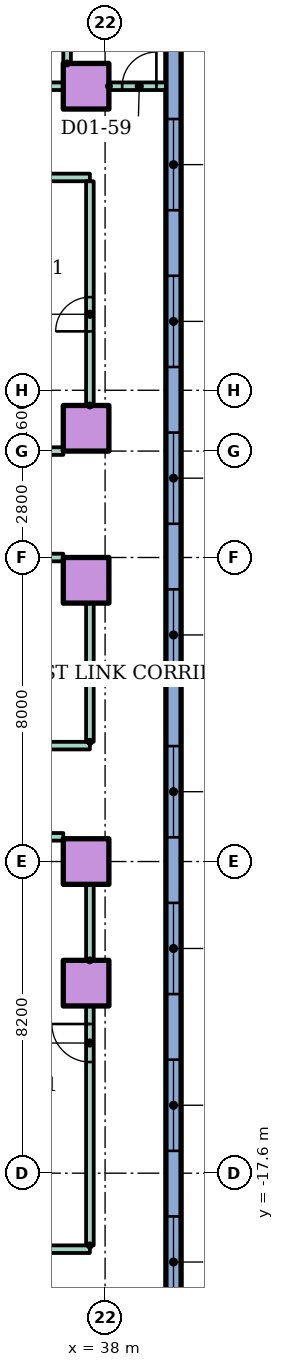
"""IFC4 building model, lengths in metres.
Left out: names, types, materials, properties, quantities, classifications, styles, units other than length and angle.
Written with IfcOpenShell. Run it as: python <this file> out.ifc"""

import sys

from ifc_helpers import new_model, si_unit, direction, frame, frame_2d, origin, origin_2d, place, context, subcontext, project, spatial, rectangle, hollow_rectangle, extrude, element, fill, save


model = new_model("IFC4")
c1 = context("Model", 3, precision=1e-05, world=origin(), true_north=direction((0.0, 1.0)))
c2 = subcontext(c1, "Body", "Model", "MODEL_VIEW")
j1 = project(units=[si_unit("LENGTHUNIT", "METRE"), si_unit("PLANEANGLEUNIT", "RADIAN")], contexts=[c1])
p1 = place(None, origin())
s1 = spatial("IfcSite", under=j1, at=p1, CompositionType="ELEMENT")
p2 = place(p1, origin())
s2 = spatial("IfcBuilding", under=s1, at=p2, CompositionType="ELEMENT")
p3 = place(p2, frame((0.0, 0.0, 6.0)))
s3 = spatial("IfcBuildingStorey", under=s2, at=p3, CompositionType="ELEMENT", Elevation=6.0)
for number, where in (
    (1, (37.5, -12.6, 0.0)),
    (2, (37.5, -9.4, 0.0)),
    (3, (37.5, -2.0, 0.0)),
    (4, (37.5, 2.0, 0.0)),
    (5, (37.5, 11.0, 0.0)),
):
    element("IfcColumn", number, at=place(p3, frame(where)), inside=s3, PredefinedType="COLUMN", context=c2, shape_type="SweptSolid", body=[
        extrude(hollow_rectangle(XDim=1.2, YDim=1.2, WallThickness=0.06, at=origin_2d()), origin(), (0.0, 0.0, 1.0), 4.0),
    ])
p4 = place(p3, frame((39.8, -50.0, 0.0), z_axis=(0.0, 0.0, 1.0), x_axis=(0.0, 1.0, 0.0)))
e6 = element("IfcWall", 6, at=p4, inside=s3, PredefinedType="STANDARD", context=c2, shape_type="SweptSolid", body=[
    extrude(rectangle(XDim=70.0, YDim=0.4, at=frame_2d((35.0, 0.0))), origin(), (0.0, 0.0, 1.0), 3.7),
])
p5 = place(p4, frame((0.75, 0.0, 0.9)))
e7 = element("IfcOpeningElement", 7, at=p5, cuts=e6, PredefinedType="OPENING", context=c2, shape_type="SweptSolid", body=[
    extrude(rectangle(XDim=2.4, YDim=2.1, at=frame_2d((1.2, 1.05))), frame((0.0, 0.21, 0.0), z_axis=(0.0, -1.0, 0.0), x_axis=(1.0, 0.0, 0.0)), (0.0, 0.0, 1.0), 0.42),
])
p6 = place(p4, frame((6.633, 0.0, 0.9)))
e8 = element("IfcOpeningElement", 8, at=p6, cuts=e6, PredefinedType="OPENING", context=c2, shape_type="SweptSolid", body=[
    extrude(rectangle(XDim=2.4, YDim=2.1, at=frame_2d((1.2, 1.05))), frame((0.0, 0.21, 0.0), z_axis=(0.0, -1.0, 0.0), x_axis=(1.0, 0.0, 0.0)), (0.0, 0.0, 1.0), 0.42),
])
p7 = place(p4, frame((10.3, 0.0, 0.9)))
e9 = element("IfcOpeningElement", 9, at=p7, cuts=e6, PredefinedType="OPENING", context=c2, shape_type="SweptSolid", body=[
    extrude(rectangle(XDim=2.4, YDim=2.1, at=frame_2d((1.2, 1.05))), frame((0.0, 0.21, 0.0), z_axis=(0.0, -1.0, 0.0), x_axis=(1.0, 0.0, 0.0)), (0.0, 0.0, 1.0), 0.42),
])
p8 = place(p4, frame((13.967, 0.0, 0.9)))
e10 = element("IfcOpeningElement", 10, at=p8, cuts=e6, PredefinedType="OPENING", context=c2, shape_type="SweptSolid", body=[
    extrude(rectangle(XDim=2.4, YDim=2.1, at=frame_2d((1.2, 1.05))), frame((0.0, 0.21, 0.0), z_axis=(0.0, -1.0, 0.0), x_axis=(1.0, 0.0, 0.0)), (0.0, 0.0, 1.0), 0.42),
])
p9 = place(p4, frame((28.863, 0.0, 0.9)))
e11 = element("IfcOpeningElement", 11, at=p9, cuts=e6, PredefinedType="OPENING", context=c2, shape_type="SweptSolid", body=[
    extrude(rectangle(XDim=2.4, YDim=2.1, at=frame_2d((1.2, 1.05))), frame((0.0, 0.21, 0.0), z_axis=(0.0, -1.0, 0.0), x_axis=(1.0, 0.0, 0.0)), (0.0, 0.0, 1.0), 0.42),
])
p10 = place(p4, frame((32.988, 0.0, 0.9)))
e12 = element("IfcOpeningElement", 12, at=p10, cuts=e6, PredefinedType="OPENING", context=c2, shape_type="SweptSolid", body=[
    extrude(rectangle(XDim=2.4, YDim=2.1, at=frame_2d((1.2, 1.05))), frame((0.0, 0.21, 0.0), z_axis=(0.0, -1.0, 0.0), x_axis=(1.0, 0.0, 0.0)), (0.0, 0.0, 1.0), 0.42),
])
p11 = place(p4, frame((37.113, 0.0, 0.9)))
e13 = element("IfcOpeningElement", 13, at=p11, cuts=e6, PredefinedType="OPENING", context=c2, shape_type="SweptSolid", body=[
    extrude(rectangle(XDim=2.4, YDim=2.1, at=frame_2d((1.2, 1.05))), frame((0.0, 0.21, 0.0), z_axis=(0.0, -1.0, 0.0), x_axis=(1.0, 0.0, 0.0)), (0.0, 0.0, 1.0), 0.42),
])
p12 = place(p4, frame((41.238, 0.0, 0.9)))
e14 = element("IfcOpeningElement", 14, at=p12, cuts=e6, PredefinedType="OPENING", context=c2, shape_type="SweptSolid", body=[
    extrude(rectangle(XDim=2.4, YDim=2.1, at=frame_2d((1.2, 1.05))), frame((0.0, 0.21, 0.0), z_axis=(0.0, -1.0, 0.0), x_axis=(1.0, 0.0, 0.0)), (0.0, 0.0, 1.0), 0.42),
])
p13 = place(p4, frame((45.363, 0.0, 0.9)))
e15 = element("IfcOpeningElement", 15, at=p13, cuts=e6, PredefinedType="OPENING", context=c2, shape_type="SweptSolid", body=[
    extrude(rectangle(XDim=2.4, YDim=2.1, at=frame_2d((1.2, 1.05))), frame((0.0, 0.21, 0.0), z_axis=(0.0, -1.0, 0.0), x_axis=(1.0, 0.0, 0.0)), (0.0, 0.0, 1.0), 0.42),
])
p14 = place(p4, frame((49.488, 0.0, 0.9)))
e16 = element("IfcOpeningElement", 16, at=p14, cuts=e6, PredefinedType="OPENING", context=c2, shape_type="SweptSolid", body=[
    extrude(rectangle(XDim=2.4, YDim=2.1, at=frame_2d((1.2, 1.05))), frame((0.0, 0.21, 0.0), z_axis=(0.0, -1.0, 0.0), x_axis=(1.0, 0.0, 0.0)), (0.0, 0.0, 1.0), 0.42),
])
p15 = place(p4, frame((53.613, 0.0, 0.9)))
e17 = element("IfcOpeningElement", 17, at=p15, cuts=e6, PredefinedType="OPENING", context=c2, shape_type="SweptSolid", body=[
    extrude(rectangle(XDim=2.4, YDim=2.1, at=frame_2d((1.2, 1.05))), frame((0.0, 0.21, 0.0), z_axis=(0.0, -1.0, 0.0), x_axis=(1.0, 0.0, 0.0)), (0.0, 0.0, 1.0), 0.42),
])
p16 = place(p4, frame((57.738, 0.0, 0.9)))
e18 = element("IfcOpeningElement", 18, at=p16, cuts=e6, PredefinedType="OPENING", context=c2, shape_type="SweptSolid", body=[
    extrude(rectangle(XDim=2.4, YDim=2.1, at=frame_2d((1.2, 1.05))), frame((0.0, 0.21, 0.0), z_axis=(0.0, -1.0, 0.0), x_axis=(1.0, 0.0, 0.0)), (0.0, 0.0, 1.0), 0.42),
])
p17 = place(p4, frame((62.05, 0.0, 0.9)))
e19 = element("IfcOpeningElement", 19, at=p17, cuts=e6, PredefinedType="OPENING", context=c2, shape_type="SweptSolid", body=[
    extrude(rectangle(XDim=2.4, YDim=2.1, at=frame_2d((1.2, 1.05))), frame((0.0, 0.21, 0.0), z_axis=(0.0, -1.0, 0.0), x_axis=(1.0, 0.0, 0.0)), (0.0, 0.0, 1.0), 0.42),
])
p18 = place(p4, frame((66.55, 0.0, 0.9)))
e20 = element("IfcOpeningElement", 20, at=p18, cuts=e6, PredefinedType="OPENING", context=c2, shape_type="SweptSolid", body=[
    extrude(rectangle(XDim=2.4, YDim=2.1, at=frame_2d((1.2, 1.05))), frame((0.0, 0.21, 0.0), z_axis=(0.0, -1.0, 0.0), x_axis=(1.0, 0.0, 0.0)), (0.0, 0.0, 1.0), 0.42),
])
p19 = place(p3, frame((-37.6, -19.6, 0.0)))
e21 = element("IfcWall", 21, at=p19, inside=s3, PredefinedType="PARTITIONING", context=c2, shape_type="SweptSolid", body=[
    extrude(rectangle(XDim=75.2, YDim=0.2, at=frame_2d((37.6, 0.0))), origin(), (0.0, 0.0, 1.0), 3.7),
])
p20 = place(p19, frame((14.5, 0.0, 0.0)))
e22 = element("IfcOpeningElement", 22, at=p20, cuts=e21, PredefinedType="OPENING", context=c2, shape_type="SweptSolid", body=[
    extrude(rectangle(XDim=1.0, YDim=2.1, at=frame_2d((0.5, 1.05))), frame((0.0, 0.11, 0.0), z_axis=(0.0, -1.0, 0.0), x_axis=(1.0, 0.0, 0.0)), (0.0, 0.0, 1.0), 0.22),
])
p21 = place(p19, frame((22.184, 0.0, 0.0)))
e23 = element("IfcOpeningElement", 23, at=p21, cuts=e21, PredefinedType="OPENING", context=c2, shape_type="SweptSolid", body=[
    extrude(rectangle(XDim=1.0, YDim=2.1, at=frame_2d((0.5, 1.05))), frame((0.0, 0.11, 0.0), z_axis=(0.0, -1.0, 0.0), x_axis=(1.0, 0.0, 0.0)), (0.0, 0.0, 1.0), 0.22),
])
p22 = place(p19, frame((29.016, 0.0, 0.0)))
e24 = element("IfcOpeningElement", 24, at=p22, cuts=e21, PredefinedType="OPENING", context=c2, shape_type="SweptSolid", body=[
    extrude(rectangle(XDim=1.0, YDim=2.1, at=frame_2d((0.5, 1.05))), frame((0.0, 0.11, 0.0), z_axis=(0.0, -1.0, 0.0), x_axis=(1.0, 0.0, 0.0)), (0.0, 0.0, 1.0), 0.22),
])
p23 = place(p19, frame((34.34, 0.0, 0.0)))
e25 = element("IfcOpeningElement", 25, at=p23, cuts=e21, PredefinedType="OPENING", context=c2, shape_type="SweptSolid", body=[
    extrude(rectangle(XDim=1.0, YDim=2.1, at=frame_2d((0.5, 1.05))), frame((0.0, 0.11, 0.0), z_axis=(0.0, -1.0, 0.0), x_axis=(1.0, 0.0, 0.0)), (0.0, 0.0, 1.0), 0.22),
])
p24 = place(p19, frame((41.06, 0.0, 0.0)))
e26 = element("IfcOpeningElement", 26, at=p24, cuts=e21, PredefinedType="OPENING", context=c2, shape_type="SweptSolid", body=[
    extrude(rectangle(XDim=1.0, YDim=2.1, at=frame_2d((0.5, 1.05))), frame((0.0, 0.11, 0.0), z_axis=(0.0, -1.0, 0.0), x_axis=(1.0, 0.0, 0.0)), (0.0, 0.0, 1.0), 0.22),
])
p25 = place(p19, frame((46.95, 0.0, 0.0)))
e27 = element("IfcOpeningElement", 27, at=p25, cuts=e21, PredefinedType="OPENING", context=c2, shape_type="SweptSolid", body=[
    extrude(rectangle(XDim=1.1, YDim=2.1, at=frame_2d((0.55, 1.05))), frame((0.0, 0.11, 0.0), z_axis=(0.0, -1.0, 0.0), x_axis=(1.0, 0.0, 0.0)), (0.0, 0.0, 1.0), 0.22),
])
p26 = place(p19, frame((55.35, 0.0, 0.0)))
e28 = element("IfcOpeningElement", 28, at=p26, cuts=e21, PredefinedType="OPENING", context=c2, shape_type="SweptSolid", body=[
    extrude(rectangle(XDim=1.1, YDim=2.1, at=frame_2d((0.55, 1.05))), frame((0.0, 0.11, 0.0), z_axis=(0.0, -1.0, 0.0), x_axis=(1.0, 0.0, 0.0)), (0.0, 0.0, 1.0), 0.22),
])
p27 = place(p19, frame((62.7, 0.0, 0.0)))
e29 = element("IfcOpeningElement", 29, at=p27, cuts=e21, PredefinedType="OPENING", context=c2, shape_type="SweptSolid", body=[
    extrude(rectangle(XDim=1.0, YDim=2.1, at=frame_2d((0.5, 1.05))), frame((0.0, 0.11, 0.0), z_axis=(0.0, -1.0, 0.0), x_axis=(1.0, 0.0, 0.0)), (0.0, 0.0, 1.0), 0.22),
])
p28 = place(p3, frame((-36.9, -8.75, 0.0)))
e30 = element("IfcWall", 30, at=p28, inside=s3, PredefinedType="PARTITIONING", context=c2, shape_type="SweptSolid", body=[
    extrude(rectangle(XDim=73.8, YDim=0.2, at=frame_2d((36.9, 0.0))), origin(), (0.0, 0.0, 1.0), 3.7),
])
p29 = place(p3, frame((-37.6, -6.35, 0.0)))
e31 = element("IfcWall", 31, at=p29, inside=s3, PredefinedType="PARTITIONING", context=c2, shape_type="SweptSolid", body=[
    extrude(rectangle(XDim=75.2, YDim=0.2, at=frame_2d((37.6, 0.0))), origin(), (0.0, 0.0, 1.0), 3.7),
])
p30 = place(p29, frame((4.0, 0.0, 0.0)))
e32 = element("IfcOpeningElement", 32, at=p30, cuts=e31, PredefinedType="OPENING", context=c2, shape_type="SweptSolid", body=[
    extrude(rectangle(XDim=1.0, YDim=2.1, at=frame_2d((0.5, 1.05))), frame((0.0, 0.11, 0.0), z_axis=(0.0, -1.0, 0.0), x_axis=(1.0, 0.0, 0.0)), (0.0, 0.0, 1.0), 0.22),
])
p31 = place(p29, frame((13.0, 0.0, 0.0)))
e33 = element("IfcOpeningElement", 33, at=p31, cuts=e31, PredefinedType="OPENING", context=c2, shape_type="SweptSolid", body=[
    extrude(rectangle(XDim=1.0, YDim=2.1, at=frame_2d((0.5, 1.05))), frame((0.0, 0.11, 0.0), z_axis=(0.0, -1.0, 0.0), x_axis=(1.0, 0.0, 0.0)), (0.0, 0.0, 1.0), 0.22),
])
p32 = place(p29, frame((21.55, 0.0, 0.0)))
e34 = element("IfcOpeningElement", 34, at=p32, cuts=e31, PredefinedType="OPENING", context=c2, shape_type="SweptSolid", body=[
    extrude(rectangle(XDim=0.9, YDim=2.1, at=frame_2d((0.45, 1.05))), frame((0.0, 0.11, 0.0), z_axis=(0.0, -1.0, 0.0), x_axis=(1.0, 0.0, 0.0)), (0.0, 0.0, 1.0), 0.22),
])
p33 = place(p29, frame((31.5, 0.0, 0.0)))
e35 = element("IfcOpeningElement", 35, at=p33, cuts=e31, PredefinedType="OPENING", context=c2, shape_type="SweptSolid", body=[
    extrude(rectangle(XDim=1.0, YDim=2.1, at=frame_2d((0.5, 1.05))), frame((0.0, 0.11, 0.0), z_axis=(0.0, -1.0, 0.0), x_axis=(1.0, 0.0, 0.0)), (0.0, 0.0, 1.0), 0.22),
])
p34 = place(p29, frame((43.5, 0.0, 0.0)))
e36 = element("IfcOpeningElement", 36, at=p34, cuts=e31, PredefinedType="OPENING", context=c2, shape_type="SweptSolid", body=[
    extrude(rectangle(XDim=1.0, YDim=2.1, at=frame_2d((0.5, 1.05))), frame((0.0, 0.11, 0.0), z_axis=(0.0, -1.0, 0.0), x_axis=(1.0, 0.0, 0.0)), (0.0, 0.0, 1.0), 0.22),
])
p35 = place(p29, frame((62.1, 0.0, 0.0)))
e37 = element("IfcOpeningElement", 37, at=p35, cuts=e31, PredefinedType="OPENING", context=c2, shape_type="SweptSolid", body=[
    extrude(rectangle(XDim=1.0, YDim=2.1, at=frame_2d((0.5, 1.05))), frame((0.0, 0.11, 0.0), z_axis=(0.0, -1.0, 0.0), x_axis=(1.0, 0.0, 0.0)), (0.0, 0.0, 1.0), 0.22),
])
p36 = place(p3, frame((14.0, -1.4, 0.0)))
e38 = element("IfcWall", 38, at=p36, inside=s3, PredefinedType="PARTITIONING", context=c2, shape_type="SweptSolid", body=[
    extrude(rectangle(XDim=22.9, YDim=0.2, at=frame_2d((11.45, 0.0))), origin(), (0.0, 0.0, 1.0), 3.7),
])
p37 = place(p3, frame((16.3, 1.4, 0.0)))
e39 = element("IfcWall", 39, at=p37, inside=s3, PredefinedType="PARTITIONING", context=c2, shape_type="SweptSolid", body=[
    extrude(rectangle(XDim=20.6, YDim=0.2, at=frame_2d((10.3, 0.0))), origin(), (0.0, 0.0, 1.0), 3.7),
])
p38 = place(p37, frame((2.35, 0.0, 0.0)))
e40 = element("IfcOpeningElement", 40, at=p38, cuts=e39, PredefinedType="OPENING", context=c2, shape_type="SweptSolid", body=[
    extrude(rectangle(XDim=1.0, YDim=2.1, at=frame_2d((0.5, 1.05))), frame((0.0, 0.11, 0.0), z_axis=(0.0, -1.0, 0.0), x_axis=(1.0, 0.0, 0.0)), (0.0, 0.0, 1.0), 0.22),
])
p39 = place(p37, frame((7.1, 0.0, 0.0)))
e41 = element("IfcOpeningElement", 41, at=p39, cuts=e39, PredefinedType="OPENING", context=c2, shape_type="SweptSolid", body=[
    extrude(rectangle(XDim=1.0, YDim=2.1, at=frame_2d((0.5, 1.05))), frame((0.0, 0.11, 0.0), z_axis=(0.0, -1.0, 0.0), x_axis=(1.0, 0.0, 0.0)), (0.0, 0.0, 1.0), 0.22),
])
p40 = place(p37, frame((10.8, 0.0, 0.0)))
e42 = element("IfcOpeningElement", 42, at=p40, cuts=e39, PredefinedType="OPENING", context=c2, shape_type="SweptSolid", body=[
    extrude(rectangle(XDim=1.0, YDim=2.1, at=frame_2d((0.5, 1.05))), frame((0.0, 0.11, 0.0), z_axis=(0.0, -1.0, 0.0), x_axis=(1.0, 0.0, 0.0)), (0.0, 0.0, 1.0), 0.22),
])
p41 = place(p37, frame((13.15, 0.0, 0.0)))
e43 = element("IfcOpeningElement", 43, at=p41, cuts=e39, PredefinedType="OPENING", context=c2, shape_type="SweptSolid", body=[
    extrude(rectangle(XDim=0.9, YDim=2.1, at=frame_2d((0.45, 1.05))), frame((0.0, 0.11, 0.0), z_axis=(0.0, -1.0, 0.0), x_axis=(1.0, 0.0, 0.0)), (0.0, 0.0, 1.0), 0.22),
])
p42 = place(p3, frame((16.3, 8.6, 0.0)))
e44 = element("IfcWall", 44, at=p42, inside=s3, PredefinedType="PARTITIONING", context=c2, shape_type="SweptSolid", body=[
    extrude(rectangle(XDim=21.3, YDim=0.2, at=frame_2d((10.65, 0.0))), origin(), (0.0, 0.0, 1.0), 3.7),
])
p43 = place(p3, frame((34.5, 11.0, 0.0)))
e45 = element("IfcWall", 45, at=p43, inside=s3, PredefinedType="PARTITIONING", context=c2, shape_type="SweptSolid", body=[
    extrude(rectangle(XDim=2.4, YDim=0.2, at=frame_2d((1.2, 0.0))), origin(), (0.0, 0.0, 1.0), 3.7),
])
p44 = place(p3, frame((38.1, 11.0, 0.0)))
e46 = element("IfcWall", 46, at=p44, inside=s3, PredefinedType="PARTITIONING", context=c2, shape_type="SweptSolid", body=[
    extrude(rectangle(XDim=1.5, YDim=0.2, at=frame_2d((0.75, 0.0))), origin(), (0.0, 0.0, 1.0), 3.7),
])
p45 = place(p44, frame((0.35, 0.0, 0.0)))
e47 = element("IfcOpeningElement", 47, at=p45, cuts=e46, PredefinedType="OPENING", context=c2, shape_type="SweptSolid", body=[
    extrude(rectangle(XDim=0.9, YDim=2.1, at=frame_2d((0.45, 1.05))), frame((0.0, 0.11, 0.0), z_axis=(0.0, -1.0, 0.0), x_axis=(1.0, 0.0, 0.0)), (0.0, 0.0, 1.0), 0.22),
])
p46 = place(p3, frame((37.0, 11.6, 0.0), z_axis=(0.0, 0.0, 1.0), x_axis=(0.0, 1.0, 0.0)))
e48 = element("IfcWall", 48, at=p46, inside=s3, PredefinedType="PARTITIONING", context=c2, shape_type="SweptSolid", body=[
    extrude(rectangle(XDim=2.8, YDim=0.2, at=frame_2d((1.4, 0.0))), origin(), (0.0, 0.0, 1.0), 3.7),
])
p47 = place(p3, frame((37.6, -19.5, 0.0), z_axis=(0.0, 0.0, 1.0), x_axis=(0.0, 1.0, 0.0)))
e49 = element("IfcWall", 49, at=p47, inside=s3, PredefinedType="PARTITIONING", context=c2, shape_type="SweptSolid", body=[
    extrude(rectangle(XDim=6.3, YDim=0.2, at=frame_2d((3.15, 0.0))), origin(), (0.0, 0.0, 1.0), 3.7),
])
p48 = place(p47, frame((4.825, 0.0, 0.0)))
e50 = element("IfcOpeningElement", 50, at=p48, cuts=e49, PredefinedType="OPENING", context=c2, shape_type="SweptSolid", body=[
    extrude(rectangle(XDim=1.0, YDim=2.1, at=frame_2d((0.5, 1.05))), frame((0.0, 0.11, 0.0), z_axis=(0.0, -1.0, 0.0), x_axis=(1.0, 0.0, 0.0)), (0.0, 0.0, 1.0), 0.22),
])
p49 = place(p3, frame((37.6, -12.0, 0.0), z_axis=(0.0, 0.0, 1.0), x_axis=(0.0, 1.0, 0.0)))
e51 = element("IfcWall", 51, at=p49, inside=s3, PredefinedType="PARTITIONING", context=c2, shape_type="SweptSolid", body=[
    extrude(rectangle(XDim=2.0, YDim=0.2, at=frame_2d((1.0, 0.0))), origin(), (0.0, 0.0, 1.0), 3.7),
])
p50 = place(p3, frame((37.6, -6.25, 0.0), z_axis=(0.0, 0.0, 1.0), x_axis=(0.0, 1.0, 0.0)))
e52 = element("IfcWall", 52, at=p50, inside=s3, PredefinedType="PARTITIONING", context=c2, shape_type="SweptSolid", body=[
    extrude(rectangle(XDim=3.65, YDim=0.2, at=frame_2d((1.825, 0.0))), origin(), (0.0, 0.0, 1.0), 3.7),
])
p51 = place(p3, frame((37.6, 2.6, 0.0), z_axis=(0.0, 0.0, 1.0), x_axis=(0.0, 1.0, 0.0)))
e53 = element("IfcWall", 53, at=p51, inside=s3, PredefinedType="PARTITIONING", context=c2, shape_type="SweptSolid", body=[
    extrude(rectangle(XDim=5.9, YDim=0.2, at=frame_2d((2.95, 0.0))), origin(), (0.0, 0.0, 1.0), 3.7),
])
p52 = place(p51, frame((1.95, 0.0, 0.0)))
e54 = element("IfcOpeningElement", 54, at=p52, cuts=e53, PredefinedType="OPENING", context=c2, shape_type="SweptSolid", body=[
    extrude(rectangle(XDim=0.9, YDim=2.1, at=frame_2d((0.45, 1.05))), frame((0.0, 0.11, 0.0), z_axis=(0.0, -1.0, 0.0), x_axis=(1.0, 0.0, 0.0)), (0.0, 0.0, 1.0), 0.22),
])
p53 = place(p9, origin())
e55 = element("IfcWindow", 55, at=p53, inside=s3, PartitioningType="SINGLE_PANEL", PredefinedType="WINDOW", context=c2, shape_type="SweptSolid", body=[
    extrude(rectangle(XDim=2.4, YDim=2.1, at=frame_2d((1.2, 1.05))), frame((0.0, 0.03, 0.0), z_axis=(0.0, -1.0, 0.0), x_axis=(1.0, 0.0, 0.0)), (0.0, 0.0, 1.0), 0.06),
])
fill(e11, e55)
p54 = place(p10, origin())
e56 = element("IfcWindow", 56, at=p54, inside=s3, PartitioningType="SINGLE_PANEL", PredefinedType="WINDOW", context=c2, shape_type="SweptSolid", body=[
    extrude(rectangle(XDim=2.4, YDim=2.1, at=frame_2d((1.2, 1.05))), frame((0.0, 0.03, 0.0), z_axis=(0.0, -1.0, 0.0), x_axis=(1.0, 0.0, 0.0)), (0.0, 0.0, 1.0), 0.06),
])
fill(e12, e56)
p55 = place(p11, origin())
e57 = element("IfcWindow", 57, at=p55, inside=s3, PartitioningType="SINGLE_PANEL", PredefinedType="WINDOW", context=c2, shape_type="SweptSolid", body=[
    extrude(rectangle(XDim=2.4, YDim=2.1, at=frame_2d((1.2, 1.05))), frame((0.0, 0.03, 0.0), z_axis=(0.0, -1.0, 0.0), x_axis=(1.0, 0.0, 0.0)), (0.0, 0.0, 1.0), 0.06),
])
fill(e13, e57)
p56 = place(p12, origin())
e58 = element("IfcWindow", 58, at=p56, inside=s3, PartitioningType="SINGLE_PANEL", PredefinedType="WINDOW", context=c2, shape_type="SweptSolid", body=[
    extrude(rectangle(XDim=2.4, YDim=2.1, at=frame_2d((1.2, 1.05))), frame((0.0, 0.03, 0.0), z_axis=(0.0, -1.0, 0.0), x_axis=(1.0, 0.0, 0.0)), (0.0, 0.0, 1.0), 0.06),
])
fill(e14, e58)
p57 = place(p13, origin())
e59 = element("IfcWindow", 59, at=p57, inside=s3, PartitioningType="SINGLE_PANEL", PredefinedType="WINDOW", context=c2, shape_type="SweptSolid", body=[
    extrude(rectangle(XDim=2.4, YDim=2.1, at=frame_2d((1.2, 1.05))), frame((0.0, 0.03, 0.0), z_axis=(0.0, -1.0, 0.0), x_axis=(1.0, 0.0, 0.0)), (0.0, 0.0, 1.0), 0.06),
])
fill(e15, e59)
p58 = place(p14, origin())
e60 = element("IfcWindow", 60, at=p58, inside=s3, PartitioningType="SINGLE_PANEL", PredefinedType="WINDOW", context=c2, shape_type="SweptSolid", body=[
    extrude(rectangle(XDim=2.4, YDim=2.1, at=frame_2d((1.2, 1.05))), frame((0.0, 0.03, 0.0), z_axis=(0.0, -1.0, 0.0), x_axis=(1.0, 0.0, 0.0)), (0.0, 0.0, 1.0), 0.06),
])
fill(e16, e60)
p59 = place(p15, origin())
e61 = element("IfcWindow", 61, at=p59, inside=s3, PartitioningType="SINGLE_PANEL", PredefinedType="WINDOW", context=c2, shape_type="SweptSolid", body=[
    extrude(rectangle(XDim=2.4, YDim=2.1, at=frame_2d((1.2, 1.05))), frame((0.0, 0.03, 0.0), z_axis=(0.0, -1.0, 0.0), x_axis=(1.0, 0.0, 0.0)), (0.0, 0.0, 1.0), 0.06),
])
fill(e17, e61)
p60 = place(p16, origin())
e62 = element("IfcWindow", 62, at=p60, inside=s3, PartitioningType="SINGLE_PANEL", PredefinedType="WINDOW", context=c2, shape_type="SweptSolid", body=[
    extrude(rectangle(XDim=2.4, YDim=2.1, at=frame_2d((1.2, 1.05))), frame((0.0, 0.03, 0.0), z_axis=(0.0, -1.0, 0.0), x_axis=(1.0, 0.0, 0.0)), (0.0, 0.0, 1.0), 0.06),
])
fill(e18, e62)
p61 = place(p48, origin())
e63 = element("IfcDoor", 63, at=p61, inside=s3, OperationType="SINGLE_SWING_RIGHT", PredefinedType="DOOR", context=c2, shape_type="SweptSolid", body=[
    extrude(rectangle(XDim=1.0, YDim=2.1, at=frame_2d((0.5, 1.05))), frame((0.0, 0.025, 0.0), z_axis=(0.0, -1.0, 0.0), x_axis=(1.0, 0.0, 0.0)), (0.0, 0.0, 1.0), 0.05),
])
fill(e50, e63)
p62 = place(p52, origin())
e64 = element("IfcDoor", 64, at=p62, inside=s3, OperationType="SINGLE_SWING_LEFT", PredefinedType="DOOR", context=c2, shape_type="SweptSolid", body=[
    extrude(rectangle(XDim=0.9, YDim=2.1, at=frame_2d((0.45, 1.05))), frame((0.0, 0.025, 0.0), z_axis=(0.0, -1.0, 0.0), x_axis=(1.0, 0.0, 0.0)), (0.0, 0.0, 1.0), 0.05),
])
fill(e54, e64)
p63 = place(p45, origin())
e65 = element("IfcDoor", 65, at=p63, inside=s3, OperationType="SINGLE_SWING_RIGHT", PredefinedType="DOOR", context=c2, shape_type="SweptSolid", body=[
    extrude(rectangle(XDim=0.9, YDim=2.1, at=frame_2d((0.45, 1.05))), frame((0.0, 0.025, 0.0), z_axis=(0.0, -1.0, 0.0), x_axis=(1.0, 0.0, 0.0)), (0.0, 0.0, 1.0), 0.05),
])
fill(e47, e65)
save(model, sys.argv[1])
